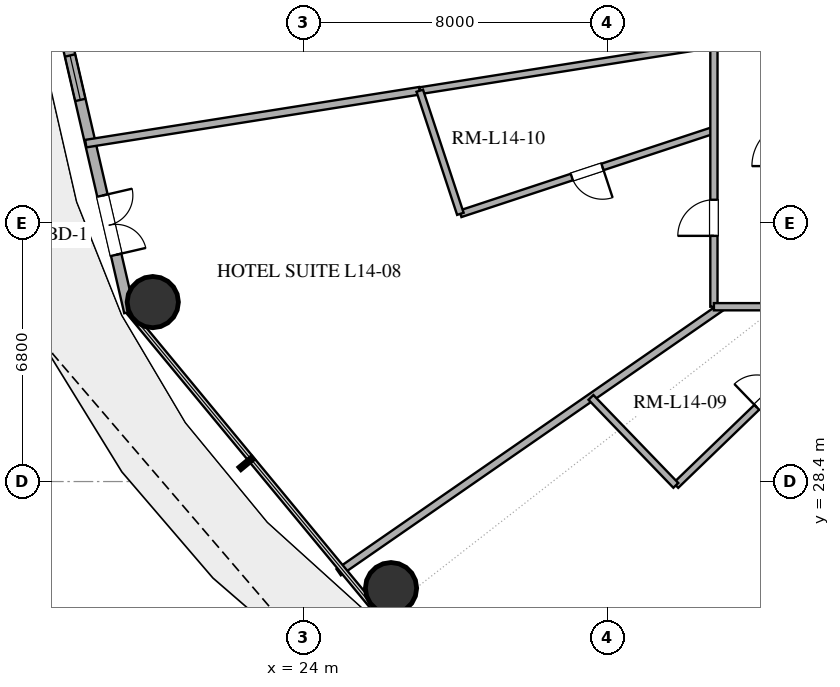
"""IFC4 building model, lengths in metres.
Left out: names, types, materials, properties, quantities, classifications, styles, units other than length and angle.
Written with IfcOpenShell. Run it as: python <this file> out.ifc"""

import sys

from ifc_helpers import new_model, si_unit, direction, frame, frame_2d, origin, origin_2d, place, context, subcontext, project, spatial, rectangle, hollow_circle, extrude, element, fill, save


model = new_model("IFC4")
c1 = context("Model", 3, precision=1e-05, world=origin(), true_north=direction((0.0, 1.0)))
c2 = subcontext(c1, "Body", "Model", "MODEL_VIEW")
j1 = project(units=[si_unit("LENGTHUNIT", "METRE"), si_unit("PLANEANGLEUNIT", "RADIAN")], contexts=[c1])
p1 = place(None, origin())
s1 = spatial("IfcSite", under=j1, at=p1, CompositionType="ELEMENT")
p2 = place(p1, origin())
s2 = spatial("IfcBuilding", under=s1, at=p2, CompositionType="ELEMENT")
p3 = place(p2, frame((0.0, 0.0, 60.6)))
s3 = spatial("IfcBuildingStorey", under=s2, at=p3, CompositionType="ELEMENT", Elevation=60.6)
for number, where, z_axis, x_axis in (
    (1, (20.034, 33.122, 0.0), (0.0, 0.0, 1.0), (1.0, 0.0, 0.0)),
    (2, (26.303, 25.595, 0.0), (0.0, 0.0, 1.0), (1.0, 0.0, 0.0)),
):
    element("IfcColumn", number, at=place(p3, frame(where, z_axis=z_axis, x_axis=x_axis)), inside=s3, PredefinedType="COLUMN", context=c2, shape_type="SweptSolid", body=[
        extrude(hollow_circle(Radius=0.675, WallThickness=0.036, at=origin_2d()), origin(), (0.0, 0.0, 1.0), 3.38),
    ])
p4 = place(p3, frame((17.304, 42.0, 0.0), z_axis=(0.0, 0.0, 1.0), x_axis=(0.225454452941, -0.974253709076, 0.0)))
e3 = element("IfcWall", 3, at=p4, inside=s3, PredefinedType="SOLIDWALL", context=c2, shape_type="SweptSolid", body=[
    extrude(rectangle(XDim=9.38, YDim=0.28, at=frame_2d((4.69, 0.0))), origin(), (0.0, 0.0, 1.0), 3.38),
])
p5 = place(p4, frame((2.452, 0.0, 0.85)))
e4 = element("IfcOpeningElement", 4, at=p5, cuts=e3, PredefinedType="OPENING", context=c2, shape_type="SweptSolid", body=[
    extrude(rectangle(XDim=1.2, YDim=1.6, at=frame_2d((0.6, 0.8))), frame((0.0, 0.15, 0.0), z_axis=(0.0, -1.0, 0.0), x_axis=(1.0, 0.0, 0.0)), (0.0, 0.0, 1.0), 0.3),
])
p6 = place(p4, frame((6.235, 0.0, 0.0)))
e5 = element("IfcOpeningElement", 5, at=p6, cuts=e3, PredefinedType="OPENING", context=c2, shape_type="SweptSolid", body=[
    extrude(rectangle(XDim=1.6, YDim=2.25, at=frame_2d((0.8, 1.125))), frame((0.0, 0.15, 0.0), z_axis=(0.0, -1.0, 0.0), x_axis=(1.0, 0.0, 0.0)), (0.0, 0.0, 1.0), 0.3),
])
p7 = place(p3, frame((25.826, 25.114, 0.0), z_axis=(0.0, 0.0, 1.0), x_axis=(0.889853976658, -0.456245438581, 0.0)))
e6 = element("IfcWall", 6, at=p7, inside=s3, PredefinedType="SOLIDWALL", context=c2, shape_type="SweptSolid", body=[
    extrude(rectangle(XDim=11.346, YDim=0.28, at=frame_2d((5.673, 0.0))), origin(), (0.0, 0.0, 1.0), 3.38),
])
p8 = place(p7, frame((3.167, 0.0, 0.85)))
e7 = element("IfcOpeningElement", 7, at=p8, cuts=e6, PredefinedType="OPENING", context=c2, shape_type="SweptSolid", body=[
    extrude(rectangle(XDim=1.8, YDim=2.2, at=frame_2d((0.9, 1.1))), frame((0.0, 0.15, 0.0), z_axis=(0.0, -1.0, 0.0), x_axis=(1.0, 0.0, 0.0)), (0.0, 0.0, 1.0), 0.3),
])
p9 = place(p7, frame((6.529, 0.0, 0.85)))
e8 = element("IfcOpeningElement", 8, at=p9, cuts=e6, PredefinedType="OPENING", context=c2, shape_type="SweptSolid", body=[
    extrude(rectangle(XDim=1.8, YDim=2.2, at=frame_2d((0.9, 1.1))), frame((0.0, 0.15, 0.0), z_axis=(0.0, -1.0, 0.0), x_axis=(1.0, 0.0, 0.0)), (0.0, 0.0, 1.0), 0.3),
])
p10 = place(p3, frame((42.893, 33.0, 0.0), z_axis=(0.0, 0.0, 1.0), x_axis=(-0.493512300658, -0.869738816599, 0.0)))
e9 = element("IfcWall", 9, at=p10, inside=s3, PredefinedType="PARTITIONING", context=c2, shape_type="SweptSolid", body=[
    extrude(rectangle(XDim=14.938, YDim=0.2, at=frame_2d((7.469, 0.0))), origin(), (0.0, 0.0, 1.0), 2.74),
])
p11 = place(p3, frame((18.271, 37.292, 0.0), z_axis=(0.0, 0.0, 1.0), x_axis=(0.987691229297, 0.156416225401, 0.0)))
e10 = element("IfcWall", 10, at=p11, inside=s3, PredefinedType="PARTITIONING", context=c2, shape_type="SweptSolid", body=[
    extrude(rectangle(XDim=8.898, YDim=0.2, at=frame_2d((4.449, 0.0))), origin(), (0.0, 0.0, 1.0), 2.74),
])
p12 = place(p3, frame((35.009, 33.0, 0.0), z_axis=(0.0, 0.0, 1.0), x_axis=(-0.821999402566, -0.569488351226, 0.0)))
e11 = element("IfcWall", 11, at=p12, inside=s3, PredefinedType="PARTITIONING", context=c2, shape_type="SweptSolid", body=[
    extrude(rectangle(XDim=12.266, YDim=0.2, at=frame_2d((6.133, 0.0))), origin(), (0.0, 0.0, 1.0), 2.74),
])
p13 = place(p3, frame((27.06, 38.683, 0.0), z_axis=(0.0, 0.0, 1.0), x_axis=(0.987690363599, 0.156421691762, 0.0)))
e12 = element("IfcWall", 12, at=p13, inside=s3, PredefinedType="PLUMBINGWALL", context=c2, shape_type="SweptSolid", body=[
    extrude(rectangle(XDim=7.837, YDim=0.18, at=frame_2d((3.918, 0.0))), origin(), (0.0, 0.0, 1.0), 2.74),
])
p14 = place(p3, frame((34.8, 37.646, 0.0), z_axis=(0.0, 0.0, 1.0), x_axis=(-0.949662150081, -0.313275917849, 0.0)))
e13 = element("IfcWall", 13, at=p14, inside=s3, PredefinedType="PLUMBINGWALL", context=c2, shape_type="SweptSolid", body=[
    extrude(rectangle(XDim=7.026, YDim=0.18, at=frame_2d((3.513, 0.0))), origin(), (0.0, 0.0, 1.0), 2.74),
])
p15 = place(p14, frame((3.088, 0.0, 0.0)))
e14 = element("IfcOpeningElement", 14, at=p15, cuts=e13, PredefinedType="OPENING", context=c2, shape_type="SweptSolid", body=[
    extrude(rectangle(XDim=0.85, YDim=2.1, at=frame_2d((0.425, 1.05))), frame((0.0, 0.1, 0.0), z_axis=(0.0, -1.0, 0.0), x_axis=(1.0, 0.0, 0.0)), (0.0, 0.0, 1.0), 0.2),
])
p16 = place(p3, frame((33.798, 28.299, 0.0), z_axis=(0.0, 0.0, 1.0), x_axis=(0.719667322044, 0.69431905172, 0.0)))
e15 = element("IfcWall", 15, at=p16, inside=s3, PredefinedType="PLUMBINGWALL", context=c2, shape_type="SweptSolid", body=[
    extrude(rectangle(XDim=6.771, YDim=0.18, at=frame_2d((3.385, 0.0))), origin(), (0.0, 0.0, 1.0), 2.74),
])
p17 = place(p16, frame((2.96, 0.0, 0.0)))
e16 = element("IfcOpeningElement", 16, at=p17, cuts=e15, PredefinedType="OPENING", context=c2, shape_type="SweptSolid", body=[
    extrude(rectangle(XDim=0.85, YDim=2.1, at=frame_2d((0.425, 1.05))), frame((0.0, 0.1, 0.0), z_axis=(0.0, -1.0, 0.0), x_axis=(1.0, 0.0, 0.0)), (0.0, 0.0, 1.0), 0.2),
])
p18 = place(p3, frame((34.8, 33.0, 0.0), z_axis=(0.0, 0.0, 1.0), x_axis=(0.0, 1.0, 0.0)))
e17 = element("IfcWall", 17, at=p18, inside=s3, PredefinedType="PARTITIONING", context=c2, shape_type="SweptSolid", body=[
    extrude(rectangle(XDim=6.942, YDim=0.19, at=frame_2d((3.471, 0.0))), origin(), (0.0, 0.0, 1.0), 2.74),
])
p19 = place(p18, frame((1.865, 0.0, 0.0)))
e18 = element("IfcOpeningElement", 18, at=p19, cuts=e17, PredefinedType="OPENING", context=c2, shape_type="SweptSolid", body=[
    extrude(rectangle(XDim=0.95, YDim=2.15, at=frame_2d((0.475, 1.075))), frame((0.0, 0.105, 0.0), z_axis=(0.0, -1.0, 0.0), x_axis=(1.0, 0.0, 0.0)), (0.0, 0.0, 1.0), 0.21),
])
p20 = place(p3, frame((47.425, 33.0, 0.0), z_axis=(0.0, 0.0, 1.0), x_axis=(-1.0, 0.0, 0.0)))
e19 = element("IfcWall", 19, at=p20, inside=s3, PredefinedType="PARTITIONING", context=c2, shape_type="SweptSolid", body=[
    extrude(rectangle(XDim=12.625, YDim=0.19, at=frame_2d((6.312, 0.0))), origin(), (0.0, 0.0, 1.0), 2.74),
])
p21 = place(p20, frame((1.784, 0.0, 0.0)))
e20 = element("IfcOpeningElement", 20, at=p21, cuts=e19, PredefinedType="OPENING", context=c2, shape_type="SweptSolid", body=[
    extrude(rectangle(XDim=1.0, YDim=2.2, at=frame_2d((0.5, 1.1))), frame((0.0, 0.105, 0.0), z_axis=(0.0, -1.0, 0.0), x_axis=(1.0, 0.0, 0.0)), (0.0, 0.0, 1.0), 0.21),
])
p22 = place(p20, frame((6.173, 0.0, 0.0)))
e21 = element("IfcOpeningElement", 21, at=p22, cuts=e19, PredefinedType="OPENING", context=c2, shape_type="SweptSolid", body=[
    extrude(rectangle(XDim=0.95, YDim=2.15, at=frame_2d((0.475, 1.075))), frame((0.0, 0.105, 0.0), z_axis=(0.0, -1.0, 0.0), x_axis=(1.0, 0.0, 0.0)), (0.0, 0.0, 1.0), 0.21),
])
p23 = place(p3, frame((28.128, 35.445, 0.0), z_axis=(0.0, 0.0, 1.0), x_axis=(-0.313262541659, 0.949666562533, 0.0)))
e22 = element("IfcWall", 22, at=p23, inside=s3, PredefinedType="PLUMBINGWALL", context=c2, shape_type="SweptSolid", body=[
    extrude(rectangle(XDim=3.41, YDim=0.18, at=frame_2d((1.705, 0.0))), origin(), (0.0, 0.0, 1.0), 2.74),
])
p24 = place(p3, frame((31.565, 30.614, 0.0), z_axis=(0.0, 0.0, 1.0), x_axis=(0.694278833189, -0.719706121821, 0.0)))
e23 = element("IfcWall", 23, at=p24, inside=s3, PredefinedType="PLUMBINGWALL", context=c2, shape_type="SweptSolid", body=[
    extrude(rectangle(XDim=3.217, YDim=0.18, at=frame_2d((1.608, 0.0))), origin(), (0.0, 0.0, 1.0), 2.74),
])
p25 = place(p5, origin())
e24 = element("IfcWindow", 24, at=p25, inside=s3, PartitioningType="SINGLE_PANEL", PredefinedType="WINDOW", context=c2, shape_type="SweptSolid", body=[
    extrude(rectangle(XDim=1.2, YDim=1.6, at=frame_2d((0.6, 0.8))), frame((0.0, 0.03, 0.0), z_axis=(0.0, -1.0, 0.0), x_axis=(1.0, 0.0, 0.0)), (0.0, 0.0, 1.0), 0.06),
])
fill(e4, e24)
p26 = place(p6, origin())
e25 = element("IfcDoor", 25, at=p26, inside=s3, OperationType="DOUBLE_DOOR_SINGLE_SWING", PredefinedType="DOOR", context=c2, shape_type="SweptSolid", body=[
    extrude(rectangle(XDim=1.6, YDim=2.25, at=frame_2d((0.8, 1.125))), frame((0.0, 0.025, 0.0), z_axis=(0.0, -1.0, 0.0), x_axis=(1.0, 0.0, 0.0)), (0.0, 0.0, 1.0), 0.05),
])
fill(e5, e25)
p27 = place(p15, origin())
e26 = element("IfcDoor", 26, at=p27, inside=s3, OperationType="SINGLE_SWING_LEFT", PredefinedType="DOOR", context=c2, shape_type="SweptSolid", body=[
    extrude(rectangle(XDim=0.85, YDim=2.1, at=frame_2d((0.425, 1.05))), frame((0.0, 0.025, 0.0), z_axis=(0.0, -1.0, 0.0), x_axis=(1.0, 0.0, 0.0)), (0.0, 0.0, 1.0), 0.05),
])
fill(e14, e26)
p28 = place(p17, origin())
e27 = element("IfcDoor", 27, at=p28, inside=s3, OperationType="SINGLE_SWING_LEFT", PredefinedType="DOOR", context=c2, shape_type="SweptSolid", body=[
    extrude(rectangle(XDim=0.85, YDim=2.1, at=frame_2d((0.425, 1.05))), frame((0.0, 0.025, 0.0), z_axis=(0.0, -1.0, 0.0), x_axis=(1.0, 0.0, 0.0)), (0.0, 0.0, 1.0), 0.05),
])
fill(e16, e27)
p29 = place(p19, origin())
e28 = element("IfcDoor", 28, at=p29, inside=s3, OperationType="SINGLE_SWING_LEFT", PredefinedType="DOOR", context=c2, shape_type="SweptSolid", body=[
    extrude(rectangle(XDim=0.95, YDim=2.15, at=frame_2d((0.475, 1.075))), frame((0.0, 0.025, 0.0), z_axis=(0.0, -1.0, 0.0), x_axis=(1.0, 0.0, 0.0)), (0.0, 0.0, 1.0), 0.05),
])
fill(e18, e28)
save(model, sys.argv[1])
